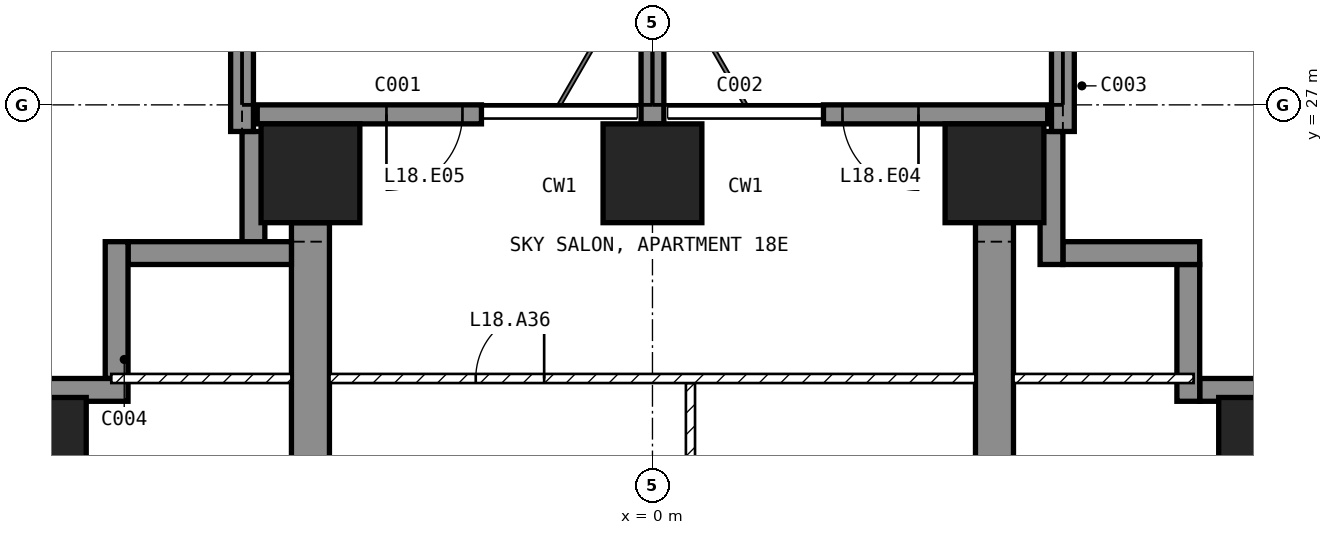
"""IFC4 building model, lengths in metres.
Left out: names, types, materials, properties, quantities, classifications, styles, units other than length and angle.
Written with IfcOpenShell. Run it as: python <this file> out.ifc"""

import sys

from ifc_helpers import new_model, si_unit, direction, frame, frame_2d, origin, origin_2d, place, context, subcontext, project, spatial, polyline, rectangle, outline, extrude, element, fill, save


model = new_model("IFC4")
c1 = context("Model", 3, precision=1e-05, world=origin(), true_north=direction((0.0, 1.0)))
c2 = subcontext(c1, "Body", "Model", "MODEL_VIEW")
j1 = project(units=[si_unit("LENGTHUNIT", "METRE"), si_unit("PLANEANGLEUNIT", "RADIAN")], contexts=[c1])
p1 = place(None, origin())
s1 = spatial("IfcSite", under=j1, at=p1, CompositionType="ELEMENT")
p2 = place(p1, origin())
s2 = spatial("IfcBuilding", under=s1, at=p2, CompositionType="ELEMENT")
p3 = place(p2, frame((0.0, 0.0, 82.0)))
s3 = spatial("IfcBuildingStorey", under=s2, at=p3, CompositionType="ELEMENT", Elevation=82.0)
for number, where, z_axis, x_axis in (
    (1, (-8.1, 22.5, -0.25), (0.0, 0.0, 1.0), (1.0, 0.0, 0.0)),
    (2, (-4.5, 26.1, -0.25), (0.0, 0.0, 1.0), (1.0, 0.0, 0.0)),
    (3, (0.0, 26.1, -0.25), (0.0, 0.0, 1.0), (1.0, 0.0, 0.0)),
    (4, (4.5, 26.1, -0.25), (0.0, 0.0, 1.0), (1.0, 0.0, 0.0)),
    (5, (8.1, 22.5, -0.25), (0.0, 0.0, 1.0), (1.0, 0.0, 0.0)),
):
    element("IfcColumn", number, at=place(p3, frame(where, z_axis=z_axis, x_axis=x_axis)), inside=s3, PredefinedType="COLUMN", context=c2, shape_type="SweptSolid", body=[
        extrude(rectangle(XDim=1.3, YDim=1.3, at=origin_2d()), origin(), (0.0, 0.0, 1.0), 3.5),
    ])
for number, where, z_axis, x_axis in (
    (6, (-4.75, 9.0, -0.25), (1.0, 0.0, 0.0), (0.0, 1.0, 0.0)),
    (7, (4.25, 9.0, -0.25), (1.0, 0.0, 0.0), (0.0, 1.0, 0.0)),
):
    element("IfcWall", number, at=place(p3, frame(where, z_axis=z_axis, x_axis=x_axis)), inside=s3, PredefinedType="SHEAR", context=c2, shape_type="SweptSolid", body=[
        extrude(outline(polyline([(0.0, 0.0), (2.1, 0.0), (2.1, 2.65), (4.5, 2.65), (4.5, 0.0), (9.9, 0.0), (9.9, 2.65), (12.3, 2.65), (12.3, 0.0), (16.45, 0.0), (16.45, 3.5), (0.0, 3.5), (0.0, 0.0)])), origin(), (0.0, 0.0, 1.0), 0.5),
    ])
p4 = place(p3, frame((5.2, 26.875, 0.0), z_axis=(0.0, 0.0, 1.0), x_axis=(-1.0, 0.0, 0.0)))
e8 = element("IfcWall", 8, at=p4, inside=s3, PredefinedType="SOLIDWALL", context=c2, shape_type="SweptSolid", body=[
    extrude(rectangle(XDim=2.95, YDim=0.25, at=frame_2d((1.475, 0.0))), origin(), (0.0, 0.0, 1.0), 3.25),
])
p5 = place(p4, frame((1.7, 0.0, 0.0)))
e9 = element("IfcOpeningElement", 9, at=p5, cuts=e8, PredefinedType="OPENING", context=c2, shape_type="SweptSolid", body=[
    extrude(rectangle(XDim=1.0, YDim=2.4, at=frame_2d((0.5, 1.2))), frame((0.0, 0.135, 0.0), z_axis=(0.0, -1.0, 0.0), x_axis=(1.0, 0.0, 0.0)), (0.0, 0.0, 1.0), 0.27),
])
p6 = place(p3, frame((-2.25, 26.875, 0.0), z_axis=(0.0, 0.0, 1.0), x_axis=(-1.0, 0.0, 0.0)))
e10 = element("IfcWall", 10, at=p6, inside=s3, PredefinedType="SOLIDWALL", context=c2, shape_type="SweptSolid", body=[
    extrude(rectangle(XDim=2.95, YDim=0.25, at=frame_2d((1.475, 0.0))), origin(), (0.0, 0.0, 1.0), 3.25),
])
p7 = place(p6, frame((0.25, 0.0, 0.0)))
e11 = element("IfcOpeningElement", 11, at=p7, cuts=e10, PredefinedType="OPENING", context=c2, shape_type="SweptSolid", body=[
    extrude(rectangle(XDim=1.0, YDim=2.4, at=frame_2d((0.5, 1.2))), frame((0.0, 0.135, 0.0), z_axis=(0.0, -1.0, 0.0), x_axis=(1.0, 0.0, 0.0)), (0.0, 0.0, 1.0), 0.27),
])
p8 = place(p3, frame((8.65, 23.25, 0.0), z_axis=(0.0, 0.0, 1.0), x_axis=(-1.0, 0.0, 0.0)))
e12 = element("IfcWall", 12, at=p8, inside=s3, PredefinedType="SOLIDWALL", context=c2, shape_type="SweptSolid", body=[
    extrude(rectangle(XDim=1.45, YDim=0.3, at=frame_2d((0.725, 0.0))), origin(), (0.0, 0.0, 1.0), 3.25),
])
p9 = place(p3, frame((7.05, 23.1, 0.0), z_axis=(0.0, 0.0, 1.0), x_axis=(0.0, 1.0, 0.0)))
e13 = element("IfcWall", 13, at=p9, inside=s3, PredefinedType="SOLIDWALL", context=c2, shape_type="SweptSolid", body=[
    extrude(rectangle(XDim=1.8, YDim=0.3, at=frame_2d((0.9, 0.0))), origin(), (0.0, 0.0, 1.0), 3.25),
])
p10 = place(p3, frame((7.2, 25.05, 0.0), z_axis=(0.0, 0.0, 1.0), x_axis=(-1.0, 0.0, 0.0)))
e14 = element("IfcWall", 14, at=p10, inside=s3, PredefinedType="SOLIDWALL", context=c2, shape_type="SweptSolid", body=[
    extrude(rectangle(XDim=1.8, YDim=0.3, at=frame_2d((0.9, 0.0))), origin(), (0.0, 0.0, 1.0), 3.25),
])
p11 = place(p3, frame((5.25, 24.9, 0.0), z_axis=(0.0, 0.0, 1.0), x_axis=(0.0, 1.0, 0.0)))
e15 = element("IfcWall", 15, at=p11, inside=s3, PredefinedType="SOLIDWALL", context=c2, shape_type="SweptSolid", body=[
    extrude(rectangle(XDim=1.75, YDim=0.3, at=frame_2d((0.875, 0.0))), origin(), (0.0, 0.0, 1.0), 3.25),
])
p12 = place(p3, frame((-5.25, 26.65, 0.0), z_axis=(0.0, 0.0, 1.0), x_axis=(0.0, -1.0, 0.0)))
e16 = element("IfcWall", 16, at=p12, inside=s3, PredefinedType="SOLIDWALL", context=c2, shape_type="SweptSolid", body=[
    extrude(rectangle(XDim=1.45, YDim=0.3, at=frame_2d((0.725, 0.0))), origin(), (0.0, 0.0, 1.0), 3.25),
])
p13 = place(p3, frame((-4.75, 25.05, 0.0), z_axis=(0.0, 0.0, 1.0), x_axis=(-1.0, 0.0, 0.0)))
e17 = element("IfcWall", 17, at=p13, inside=s3, PredefinedType="SOLIDWALL", context=c2, shape_type="SweptSolid", body=[
    extrude(rectangle(XDim=2.15, YDim=0.3, at=frame_2d((1.075, 0.0))), origin(), (0.0, 0.0, 1.0), 3.25),
])
p14 = place(p3, frame((-7.05, 25.2, 0.0), z_axis=(0.0, 0.0, 1.0), x_axis=(0.0, -1.0, 0.0)))
e18 = element("IfcWall", 18, at=p14, inside=s3, PredefinedType="SOLIDWALL", context=c2, shape_type="SweptSolid", body=[
    extrude(rectangle(XDim=1.8, YDim=0.3, at=frame_2d((0.9, 0.0))), origin(), (0.0, 0.0, 1.0), 3.25),
])
p15 = place(p3, frame((-6.9, 23.25, 0.0), z_axis=(0.0, 0.0, 1.0), x_axis=(-1.0, 0.0, 0.0)))
e19 = element("IfcWall", 19, at=p15, inside=s3, PredefinedType="SOLIDWALL", context=c2, shape_type="SweptSolid", body=[
    extrude(rectangle(XDim=1.75, YDim=0.3, at=frame_2d((0.875, 0.0))), origin(), (0.0, 0.0, 1.0), 3.25),
])
p16 = place(p3, frame((-5.4, 26.65, 0.0), z_axis=(0.0, 0.0, 1.0), x_axis=(0.0, 1.0, 0.0)))
e20 = element("IfcWall", 20, at=p16, inside=s3, PredefinedType="SOLIDWALL", context=c2, shape_type="SweptSolid", body=[
    extrude(rectangle(XDim=3.05, YDim=0.3, at=frame_2d((1.525, 0.0))), origin(), (0.0, 0.0, 1.0), 3.25),
])
p17 = place(p3, frame((0.0, 26.75, 0.0), z_axis=(0.0, 0.0, 1.0), x_axis=(0.0, 1.0, 0.0)))
e21 = element("IfcWall", 21, at=p17, inside=s3, PredefinedType="SOLIDWALL", context=c2, shape_type="SweptSolid", body=[
    extrude(rectangle(XDim=2.95, YDim=0.3, at=frame_2d((1.475, 0.0))), origin(), (0.0, 0.0, 1.0), 3.25),
])
p18 = place(p3, frame((5.4, 26.65, 0.0), z_axis=(0.0, 0.0, 1.0), x_axis=(0.0, 1.0, 0.0)))
e22 = element("IfcWall", 22, at=p18, inside=s3, PredefinedType="SOLIDWALL", context=c2, shape_type="SweptSolid", body=[
    extrude(rectangle(XDim=3.05, YDim=0.3, at=frame_2d((1.525, 0.0))), origin(), (0.0, 0.0, 1.0), 3.25),
])
p19 = place(p3, frame((0.5, 23.34, 0.0), z_axis=(0.0, 0.0, 1.0), x_axis=(0.0, -1.0, 0.0)))
e23 = element("IfcWall", 23, at=p19, inside=s3, PredefinedType="PARTITIONING", context=c2, shape_type="SweptSolid", body=[
    extrude(rectangle(XDim=4.38, YDim=0.12, at=frame_2d((2.19, 0.0))), origin(), (0.0, 0.0, 1.0), 3.25),
])
p20 = place(p19, frame((1.74, 0.0, 0.0)))
e24 = element("IfcOpeningElement", 24, at=p20, cuts=e23, PredefinedType="OPENING", context=c2, shape_type="SweptSolid", body=[
    extrude(rectangle(XDim=0.9, YDim=2.1, at=frame_2d((0.45, 1.05))), frame((0.0, 0.07, 0.0), z_axis=(0.0, -1.0, 0.0), x_axis=(1.0, 0.0, 0.0)), (0.0, 0.0, 1.0), 0.14),
])
p21 = place(p3, frame((-4.25, 23.4, 0.0), z_axis=(0.0, 0.0, 1.0), x_axis=(1.0, 0.0, 0.0)))
e25 = element("IfcWall", 25, at=p21, inside=s3, PredefinedType="PARTITIONING", context=c2, shape_type="SweptSolid", body=[
    extrude(rectangle(XDim=8.5, YDim=0.12, at=frame_2d((4.25, 0.0))), origin(), (0.0, 0.0, 1.0), 3.25),
])
p22 = place(p21, frame((1.925, 0.0, 0.0)))
e26 = element("IfcOpeningElement", 26, at=p22, cuts=e25, PredefinedType="OPENING", context=c2, shape_type="SweptSolid", body=[
    extrude(rectangle(XDim=0.9, YDim=2.1, at=frame_2d((0.45, 1.05))), frame((0.0, 0.07, 0.0), z_axis=(0.0, -1.0, 0.0), x_axis=(1.0, 0.0, 0.0)), (0.0, 0.0, 1.0), 0.14),
])
for number, where, z_axis, x_axis in (
    (27, (4.75, 23.4, 0.0), (0.0, 0.0, 1.0), (1.0, 0.0, 0.0)),
    (28, (-7.12, 23.4, 0.0), (0.0, 0.0, 1.0), (1.0, 0.0, 0.0)),
):
    element("IfcWall", number, at=place(p3, frame(where, z_axis=z_axis, x_axis=x_axis)), inside=s3, PredefinedType="PARTITIONING", context=c2, shape_type="SweptSolid", body=[
        extrude(rectangle(XDim=2.37, YDim=0.12, at=frame_2d((1.185, 0.0))), origin(), (0.0, 0.0, 1.0), 3.25),
    ])
p23 = place(p5, origin())
e29 = element("IfcDoor", 29, at=p23, inside=s3, OperationType="SINGLE_SWING_LEFT", PredefinedType="DOOR", context=c2, shape_type="SweptSolid", body=[
    extrude(rectangle(XDim=1.0, YDim=2.4, at=frame_2d((0.5, 1.2))), frame((0.0, 0.025, 0.0), z_axis=(0.0, -1.0, 0.0), x_axis=(1.0, 0.0, 0.0)), (0.0, 0.0, 1.0), 0.05),
])
fill(e9, e29)
p24 = place(p7, origin())
e30 = element("IfcDoor", 30, at=p24, inside=s3, OperationType="SINGLE_SWING_RIGHT", PredefinedType="DOOR", context=c2, shape_type="SweptSolid", body=[
    extrude(rectangle(XDim=1.0, YDim=2.4, at=frame_2d((0.5, 1.2))), frame((0.0, 0.025, 0.0), z_axis=(0.0, -1.0, 0.0), x_axis=(1.0, 0.0, 0.0)), (0.0, 0.0, 1.0), 0.05),
])
fill(e11, e30)
p25 = place(p22, origin())
e31 = element("IfcDoor", 31, at=p25, inside=s3, OperationType="SINGLE_SWING_RIGHT", PredefinedType="DOOR", context=c2, shape_type="SweptSolid", body=[
    extrude(rectangle(XDim=0.9, YDim=2.1, at=frame_2d((0.45, 1.05))), frame((0.0, 0.025, 0.0), z_axis=(0.0, -1.0, 0.0), x_axis=(1.0, 0.0, 0.0)), (0.0, 0.0, 1.0), 0.05),
])
fill(e26, e31)
save(model, sys.argv[1])
